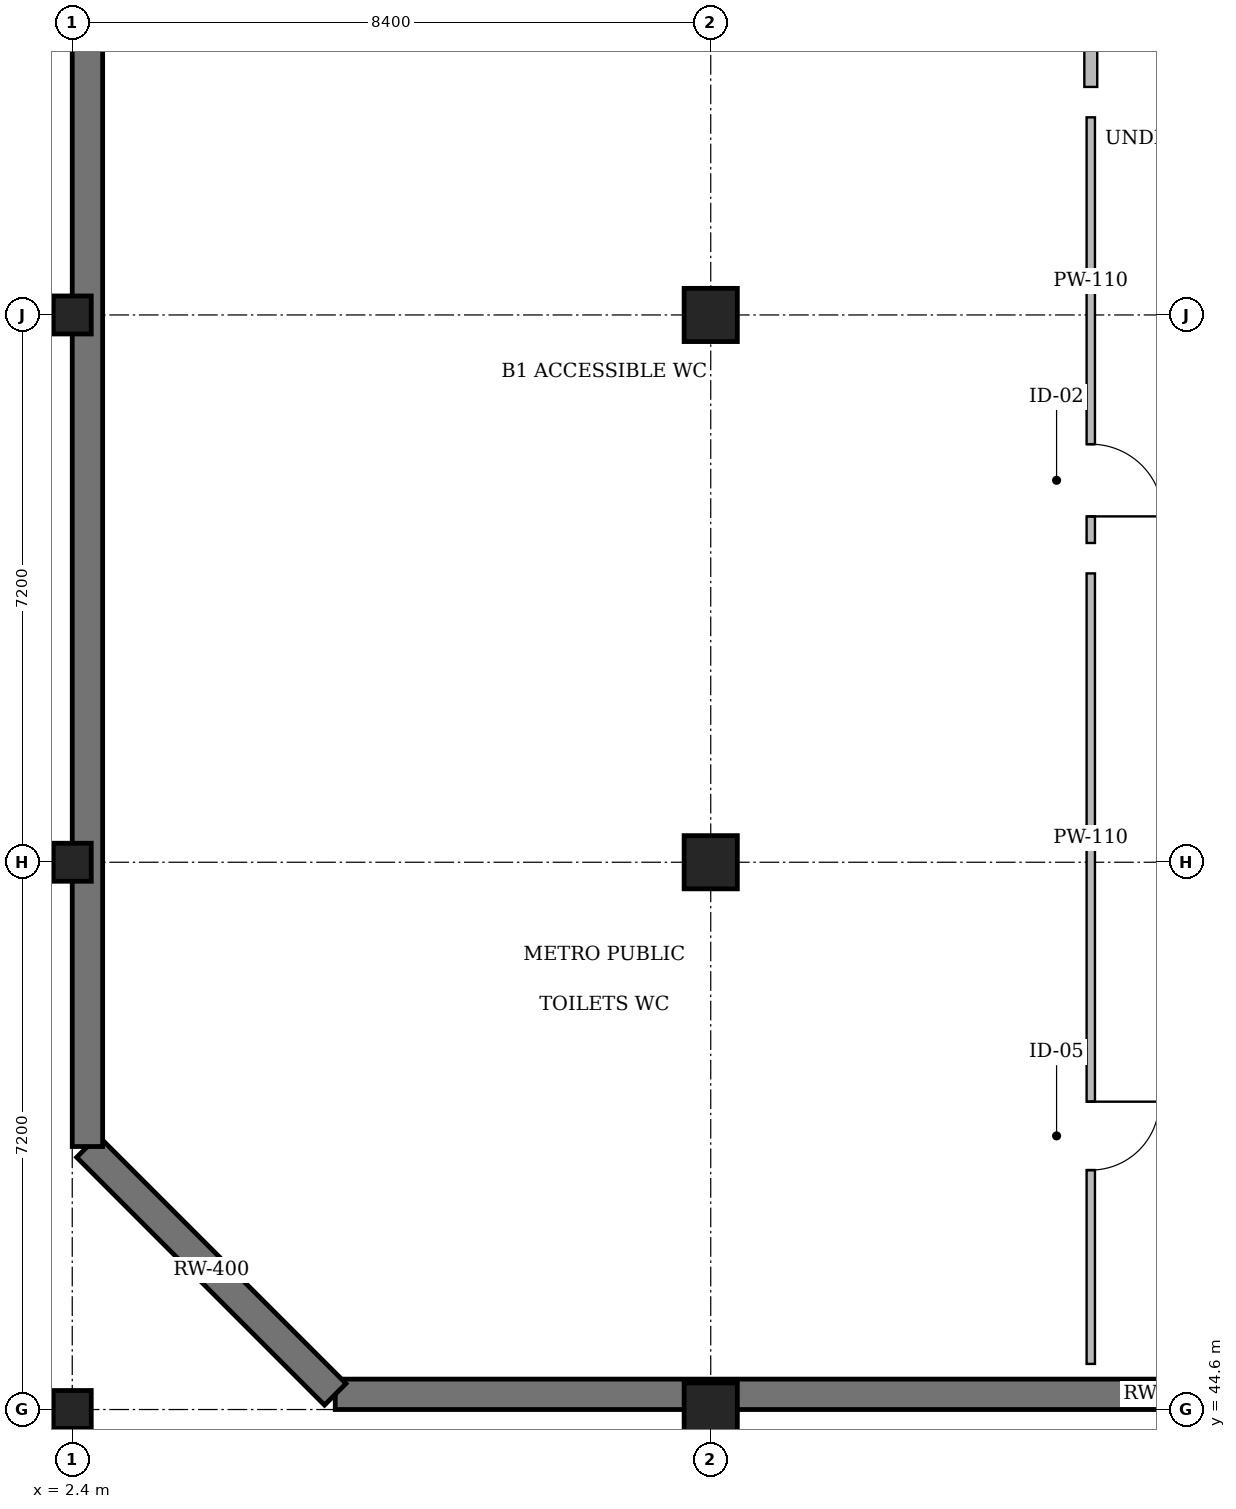
"""IFC4 building model, lengths in metres.
Left out: names, types, materials, properties, quantities, classifications, styles, units other than length and angle.
Written with IfcOpenShell. Run it as: python <this file> out.ifc"""

import sys

from ifc_helpers import new_model, si_unit, direction, frame, frame_2d, origin, origin_2d, place, context, subcontext, project, spatial, rectangle, extrude, element, fill, save


model = new_model("IFC4")
c1 = context("Model", 3, precision=1e-05, world=origin(), true_north=direction((0.0, 1.0)))
c2 = subcontext(c1, "Body", "Model", "MODEL_VIEW")
j1 = project(units=[si_unit("LENGTHUNIT", "METRE"), si_unit("PLANEANGLEUNIT", "RADIAN")], contexts=[c1])
p1 = place(None, origin())
s1 = spatial("IfcSite", under=j1, at=p1, CompositionType="ELEMENT")
p2 = place(p1, origin())
s2 = spatial("IfcBuilding", under=s1, at=p2, CompositionType="ELEMENT")
p3 = place(p2, frame((0.0, 0.0, -4.8)))
s3 = spatial("IfcBuildingStorey", under=s2, at=p3, CompositionType="ELEMENT", Elevation=-4.8)
for number, where, z_axis, x_axis in (
    (1, (2.4, 44.6, 0.0), (0.0, 0.0, 1.0), (1.0, 0.0, 0.0)),
    (2, (2.4, 51.8, 0.0), (0.0, 0.0, 1.0), (1.0, 0.0, 0.0)),
    (3, (2.4, 59.0, 0.0), (0.0, 0.0, 1.0), (1.0, 0.0, 0.0)),
):
    element("IfcColumn", number, at=place(p3, frame(where, z_axis=z_axis, x_axis=x_axis)), inside=s3, PredefinedType="COLUMN", context=c2, shape_type="SweptSolid", body=[
        extrude(rectangle(XDim=0.5, YDim=0.5, at=origin_2d()), origin(), (0.0, 0.0, 1.0), 4.8),
    ])
for number, where, z_axis, x_axis in (
    (4, (10.8, 44.6, 0.0), (0.0, 0.0, 1.0), (1.0, 0.0, 0.0)),
    (5, (10.8, 51.8, 0.0), (0.0, 0.0, 1.0), (1.0, 0.0, 0.0)),
    (6, (10.8, 59.0, 0.0), (0.0, 0.0, 1.0), (1.0, 0.0, 0.0)),
):
    element("IfcColumn", number, at=place(p3, frame(where, z_axis=z_axis, x_axis=x_axis)), inside=s3, PredefinedType="COLUMN", context=c2, shape_type="SweptSolid", body=[
        extrude(rectangle(XDim=0.7, YDim=0.7, at=origin_2d()), origin(), (0.0, 0.0, 1.0), 4.8),
    ])
p4 = place(p3, frame((5.86, 44.8, 0.0), z_axis=(0.0, 0.0, 1.0), x_axis=(1.0, 0.0, 0.0)))
e7 = element("IfcWall", 7, at=p4, inside=s3, PredefinedType="SOLIDWALL", context=c2, shape_type="SweptSolid", body=[
    extrude(rectangle(XDim=21.74, YDim=0.4, at=frame_2d((10.87, 0.0))), origin(), (0.0, 0.0, 1.0), 4.48),
])
p5 = place(p3, frame((2.6, 48.06, 0.0), z_axis=(0.0, 0.0, 1.0), x_axis=(0.707106781187, -0.707106781187, 0.0)))
e8 = element("IfcWall", 8, at=p5, inside=s3, PredefinedType="SOLIDWALL", context=c2, shape_type="SweptSolid", body=[
    extrude(rectangle(XDim=4.61, YDim=0.4, at=frame_2d((2.305, 0.0))), origin(), (0.0, 0.0, 1.0), 4.48),
])
p6 = place(p3, frame((2.6, 48.06, 0.0), z_axis=(0.0, 0.0, 1.0), x_axis=(0.0, 1.0, 0.0)))
e9 = element("IfcWall", 9, at=p6, inside=s3, PredefinedType="SOLIDWALL", context=c2, shape_type="SweptSolid", body=[
    extrude(rectangle(XDim=36.28, YDim=0.4, at=frame_2d((18.14, 0.0))), origin(), (0.0, 0.0, 1.0), 4.48),
])
p7 = place(p3, frame((15.8, 55.6, 0.0), z_axis=(0.0, 0.0, 1.0), x_axis=(0.0, -1.0, 0.0)))
e10 = element("IfcWall", 10, at=p7, inside=s3, PredefinedType="PARTITIONING", context=c2, shape_type="SweptSolid", body=[
    extrude(rectangle(XDim=10.4, YDim=0.11, at=frame_2d((5.2, 0.0))), origin(), (0.0, 0.0, 1.0), 4.54),
])
p8 = place(p7, frame((6.95, 0.0, 0.0)))
e11 = element("IfcOpeningElement", 11, at=p8, cuts=e10, PredefinedType="OPENING", context=c2, shape_type="SweptSolid", body=[
    extrude(rectangle(XDim=0.9, YDim=2.15, at=frame_2d((0.45, 1.075))), frame((0.0, 0.075, 0.0), z_axis=(0.0, -1.0, 0.0), x_axis=(1.0, 0.0, 0.0)), (0.0, 0.0, 1.0), 0.15),
])
p9 = place(p3, frame((15.8, 61.6, 0.0), z_axis=(0.0, 0.0, 1.0), x_axis=(0.0, -1.0, 0.0)))
e12 = element("IfcWall", 12, at=p9, inside=s3, PredefinedType="PARTITIONING", context=c2, shape_type="SweptSolid", body=[
    extrude(rectangle(XDim=5.6, YDim=0.11, at=frame_2d((2.8, 0.0))), origin(), (0.0, 0.0, 1.0), 4.54),
])
p10 = place(p9, frame((4.3, 0.0, 0.0)))
e13 = element("IfcOpeningElement", 13, at=p10, cuts=e12, PredefinedType="OPENING", context=c2, shape_type="SweptSolid", body=[
    extrude(rectangle(XDim=0.95, YDim=2.1, at=frame_2d((0.475, 1.05))), frame((0.0, 0.075, 0.0), z_axis=(0.0, -1.0, 0.0), x_axis=(1.0, 0.0, 0.0)), (0.0, 0.0, 1.0), 0.15),
])
p11 = place(p3, frame((15.8, 76.4, 0.0), z_axis=(0.0, 0.0, 1.0), x_axis=(0.0, -1.0, 0.0)))
e14 = element("IfcWall", 14, at=p11, inside=s3, PredefinedType="PARTITIONING", context=c2, shape_type="SweptSolid", body=[
    extrude(rectangle(XDim=14.4, YDim=0.17, at=frame_2d((7.2, 0.0))), origin(), (0.0, 0.0, 1.0), 4.54),
])
p12 = place(p11, frame((6.032, 0.0, 0.0)))
e15 = element("IfcOpeningElement", 15, at=p12, cuts=e14, PredefinedType="OPENING", context=c2, shape_type="SweptSolid", body=[
    extrude(rectangle(XDim=1.1, YDim=2.1, at=frame_2d((0.55, 1.05))), frame((0.0, 0.105, 0.0), z_axis=(0.0, -1.0, 0.0), x_axis=(1.0, 0.0, 0.0)), (0.0, 0.0, 1.0), 0.21),
])
p13 = place(p8, origin())
e16 = element("IfcDoor", 16, at=p13, inside=s3, OperationType="SINGLE_SWING_LEFT", PredefinedType="DOOR", context=c2, shape_type="SweptSolid", body=[
    extrude(rectangle(XDim=0.9, YDim=2.15, at=frame_2d((0.45, 1.075))), frame((0.0, 0.025, 0.0), z_axis=(0.0, -1.0, 0.0), x_axis=(1.0, 0.0, 0.0)), (0.0, 0.0, 1.0), 0.05),
])
fill(e11, e16)
p14 = place(p10, origin())
e17 = element("IfcDoor", 17, at=p14, inside=s3, OperationType="SINGLE_SWING_RIGHT", PredefinedType="DOOR", context=c2, shape_type="SweptSolid", body=[
    extrude(rectangle(XDim=0.95, YDim=2.1, at=frame_2d((0.475, 1.05))), frame((0.0, 0.025, 0.0), z_axis=(0.0, -1.0, 0.0), x_axis=(1.0, 0.0, 0.0)), (0.0, 0.0, 1.0), 0.05),
])
fill(e13, e17)
save(model, sys.argv[1])
